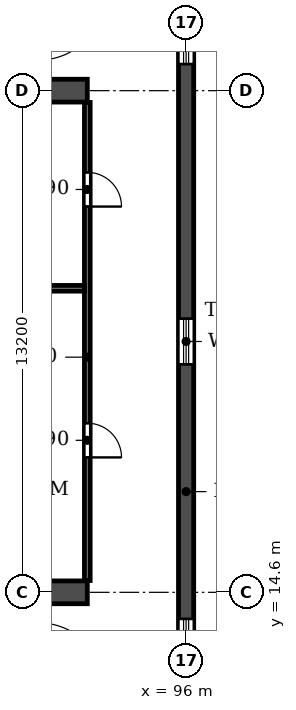
"""IFC4 building model, lengths in metres.
Left out: names, types, materials, properties, quantities, classifications, styles, units other than length and angle.
Written with IfcOpenShell. Run it as: python <this file> out.ifc"""

import sys

from ifc_helpers import new_model, si_unit, direction, frame, frame_2d, origin, place, context, subcontext, project, spatial, rectangle, extrude, element, fill, save


model = new_model("IFC4")
c1 = context("Model", 3, precision=1e-05, world=origin(), true_north=direction((0.0, 1.0)))
c2 = subcontext(c1, "Body", "Model", "MODEL_VIEW")
j1 = project(units=[si_unit("LENGTHUNIT", "METRE"), si_unit("PLANEANGLEUNIT", "RADIAN")], contexts=[c1])
p1 = place(None, origin())
s1 = spatial("IfcSite", under=j1, at=p1, CompositionType="ELEMENT")
p2 = place(p1, origin())
s2 = spatial("IfcBuilding", under=s1, at=p2, CompositionType="ELEMENT")
p3 = place(p2, frame((0.0, 0.0, 53.1)))
s3 = spatial("IfcBuildingStorey", under=s2, at=p3, CompositionType="ELEMENT", Elevation=53.1)
p4 = place(p3, frame((96.0, 4.683, 0.0), z_axis=(0.0, 0.0, 1.0), x_axis=(0.0, 1.0, 0.0)))
e1 = element("IfcWall", 1, at=p4, inside=s3, PredefinedType="SHEAR", context=c2, shape_type="SweptSolid", body=[
    extrude(rectangle(XDim=35.434, YDim=0.4, at=frame_2d((17.717, 0.0))), origin(), (0.0, 0.0, 1.0), 3.05),
])
p5 = place(p4, frame((15.917, 0.0, 0.9)))
e2 = element("IfcOpeningElement", 2, at=p5, cuts=e1, PredefinedType="OPENING", context=c2, shape_type="SweptSolid", body=[
    extrude(rectangle(XDim=1.2, YDim=1.5, at=frame_2d((0.6, 0.75))), frame((0.0, 0.21, 0.0), z_axis=(0.0, -1.0, 0.0), x_axis=(1.0, 0.0, 0.0)), (0.0, 0.0, 1.0), 0.42),
])
p6 = place(p4, frame((23.817, 0.0, 0.9)))
e3 = element("IfcOpeningElement", 3, at=p6, cuts=e1, PredefinedType="OPENING", context=c2, shape_type="SweptSolid", body=[
    extrude(rectangle(XDim=1.2, YDim=1.5, at=frame_2d((0.6, 0.75))), frame((0.0, 0.21, 0.0), z_axis=(0.0, -1.0, 0.0), x_axis=(1.0, 0.0, 0.0)), (0.0, 0.0, 1.0), 0.42),
])
p7 = place(p4, frame((8.017, 0.0, 0.9)))
e4 = element("IfcOpeningElement", 4, at=p7, cuts=e1, PredefinedType="OPENING", context=c2, shape_type="SweptSolid", body=[
    extrude(rectangle(XDim=1.2, YDim=1.5, at=frame_2d((0.6, 0.75))), frame((0.0, 0.21, 0.0), z_axis=(0.0, -1.0, 0.0), x_axis=(1.0, 0.0, 0.0)), (0.0, 0.0, 1.0), 0.42),
])
p8 = place(p4, frame((30.076, 0.0, 0.0)))
e5 = element("IfcOpeningElement", 5, at=p8, cuts=e1, PredefinedType="OPENING", context=c2, shape_type="SweptSolid", body=[
    extrude(rectangle(XDim=1.0, YDim=2.1, at=frame_2d((0.5, 1.05))), frame((0.0, 0.21, 0.0), z_axis=(0.0, -1.0, 0.0), x_axis=(1.0, 0.0, 0.0)), (0.0, 0.0, 1.0), 0.42),
])
p9 = place(p4, frame((3.159, 0.0, 0.0)))
e6 = element("IfcOpeningElement", 6, at=p9, cuts=e1, PredefinedType="OPENING", context=c2, shape_type="SweptSolid", body=[
    extrude(rectangle(XDim=1.0, YDim=2.1, at=frame_2d((0.5, 1.05))), frame((0.0, 0.21, 0.0), z_axis=(0.0, -1.0, 0.0), x_axis=(1.0, 0.0, 0.0)), (0.0, 0.0, 1.0), 0.42),
])
p10 = place(p3, frame((8.6, 14.6, 0.0), z_axis=(0.0, 0.0, 1.0), x_axis=(1.0, 0.0, 0.0)))
e7 = element("IfcWall", 7, at=p10, inside=s3, PredefinedType="SOLIDWALL", context=c2, shape_type="SweptSolid", body=[
    extrude(rectangle(XDim=84.8, YDim=0.6, at=frame_2d((42.4, 0.0))), origin(), (0.0, 0.0, 1.0), 3.05),
])
p11 = place(p10, frame((6.6, 0.0, 0.0)))
e8 = element("IfcOpeningElement", 8, at=p11, cuts=e7, PredefinedType="OPENING", context=c2, shape_type="SweptSolid", body=[
    extrude(rectangle(XDim=0.9, YDim=2.1, at=frame_2d((0.45, 1.05))), frame((0.0, 0.31, 0.0), z_axis=(0.0, -1.0, 0.0), x_axis=(1.0, 0.0, 0.0)), (0.0, 0.0, 1.0), 0.62),
])
p12 = place(p10, frame((10.3, 0.0, 0.0)))
e9 = element("IfcOpeningElement", 9, at=p12, cuts=e7, PredefinedType="OPENING", context=c2, shape_type="SweptSolid", body=[
    extrude(rectangle(XDim=1.0, YDim=2.1, at=frame_2d((0.5, 1.05))), frame((0.0, 0.31, 0.0), z_axis=(0.0, -1.0, 0.0), x_axis=(1.0, 0.0, 0.0)), (0.0, 0.0, 1.0), 0.62),
])
p13 = place(p10, frame((18.25, 0.0, 0.0)))
e10 = element("IfcOpeningElement", 10, at=p13, cuts=e7, PredefinedType="OPENING", context=c2, shape_type="SweptSolid", body=[
    extrude(rectangle(XDim=0.9, YDim=2.1, at=frame_2d((0.45, 1.05))), frame((0.0, 0.31, 0.0), z_axis=(0.0, -1.0, 0.0), x_axis=(1.0, 0.0, 0.0)), (0.0, 0.0, 1.0), 0.62),
])
p14 = place(p10, frame((22.8, 0.0, 0.0)))
e11 = element("IfcOpeningElement", 11, at=p14, cuts=e7, PredefinedType="OPENING", context=c2, shape_type="SweptSolid", body=[
    extrude(rectangle(XDim=1.0, YDim=2.1, at=frame_2d((0.5, 1.05))), frame((0.0, 0.31, 0.0), z_axis=(0.0, -1.0, 0.0), x_axis=(1.0, 0.0, 0.0)), (0.0, 0.0, 1.0), 0.62),
])
p15 = place(p10, frame((34.1, 0.0, 0.0)))
e12 = element("IfcOpeningElement", 12, at=p15, cuts=e7, PredefinedType="OPENING", context=c2, shape_type="SweptSolid", body=[
    extrude(rectangle(XDim=1.0, YDim=2.1, at=frame_2d((0.5, 1.05))), frame((0.0, 0.31, 0.0), z_axis=(0.0, -1.0, 0.0), x_axis=(1.0, 0.0, 0.0)), (0.0, 0.0, 1.0), 0.62),
])
p16 = place(p10, frame((38.0, 0.0, 0.0)))
e13 = element("IfcOpeningElement", 13, at=p16, cuts=e7, PredefinedType="OPENING", context=c2, shape_type="SweptSolid", body=[
    extrude(rectangle(XDim=1.0, YDim=2.1, at=frame_2d((0.5, 1.05))), frame((0.0, 0.31, 0.0), z_axis=(0.0, -1.0, 0.0), x_axis=(1.0, 0.0, 0.0)), (0.0, 0.0, 1.0), 0.62),
])
p17 = place(p10, frame((41.9, 0.0, 0.0)))
e14 = element("IfcOpeningElement", 14, at=p17, cuts=e7, PredefinedType="OPENING", context=c2, shape_type="SweptSolid", body=[
    extrude(rectangle(XDim=1.0, YDim=2.1, at=frame_2d((0.5, 1.05))), frame((0.0, 0.31, 0.0), z_axis=(0.0, -1.0, 0.0), x_axis=(1.0, 0.0, 0.0)), (0.0, 0.0, 1.0), 0.62),
])
p18 = place(p10, frame((45.8, 0.0, 0.0)))
e15 = element("IfcOpeningElement", 15, at=p18, cuts=e7, PredefinedType="OPENING", context=c2, shape_type="SweptSolid", body=[
    extrude(rectangle(XDim=1.0, YDim=2.1, at=frame_2d((0.5, 1.05))), frame((0.0, 0.31, 0.0), z_axis=(0.0, -1.0, 0.0), x_axis=(1.0, 0.0, 0.0)), (0.0, 0.0, 1.0), 0.62),
])
p19 = place(p10, frame((49.7, 0.0, 0.0)))
e16 = element("IfcOpeningElement", 16, at=p19, cuts=e7, PredefinedType="OPENING", context=c2, shape_type="SweptSolid", body=[
    extrude(rectangle(XDim=1.0, YDim=2.1, at=frame_2d((0.5, 1.05))), frame((0.0, 0.31, 0.0), z_axis=(0.0, -1.0, 0.0), x_axis=(1.0, 0.0, 0.0)), (0.0, 0.0, 1.0), 0.62),
])
p20 = place(p10, frame((61.0, 0.0, 0.0)))
e17 = element("IfcOpeningElement", 17, at=p20, cuts=e7, PredefinedType="OPENING", context=c2, shape_type="SweptSolid", body=[
    extrude(rectangle(XDim=1.0, YDim=2.1, at=frame_2d((0.5, 1.05))), frame((0.0, 0.31, 0.0), z_axis=(0.0, -1.0, 0.0), x_axis=(1.0, 0.0, 0.0)), (0.0, 0.0, 1.0), 0.62),
])
p21 = place(p10, frame((65.65, 0.0, 0.0)))
e18 = element("IfcOpeningElement", 18, at=p21, cuts=e7, PredefinedType="OPENING", context=c2, shape_type="SweptSolid", body=[
    extrude(rectangle(XDim=0.9, YDim=2.1, at=frame_2d((0.45, 1.05))), frame((0.0, 0.31, 0.0), z_axis=(0.0, -1.0, 0.0), x_axis=(1.0, 0.0, 0.0)), (0.0, 0.0, 1.0), 0.62),
])
p22 = place(p10, frame((73.5, 0.0, 0.0)))
e19 = element("IfcOpeningElement", 19, at=p22, cuts=e7, PredefinedType="OPENING", context=c2, shape_type="SweptSolid", body=[
    extrude(rectangle(XDim=1.0, YDim=2.1, at=frame_2d((0.5, 1.05))), frame((0.0, 0.31, 0.0), z_axis=(0.0, -1.0, 0.0), x_axis=(1.0, 0.0, 0.0)), (0.0, 0.0, 1.0), 0.62),
])
p23 = place(p10, frame((77.3, 0.0, 0.0)))
e20 = element("IfcOpeningElement", 20, at=p23, cuts=e7, PredefinedType="OPENING", context=c2, shape_type="SweptSolid", body=[
    extrude(rectangle(XDim=0.9, YDim=2.1, at=frame_2d((0.45, 1.05))), frame((0.0, 0.31, 0.0), z_axis=(0.0, -1.0, 0.0), x_axis=(1.0, 0.0, 0.0)), (0.0, 0.0, 1.0), 0.62),
])
p24 = place(p3, frame((8.6, 27.8, 0.0), z_axis=(0.0, 0.0, 1.0), x_axis=(1.0, 0.0, 0.0)))
e21 = element("IfcWall", 21, at=p24, inside=s3, PredefinedType="SOLIDWALL", context=c2, shape_type="SweptSolid", body=[
    extrude(rectangle(XDim=84.8, YDim=0.6, at=frame_2d((42.4, 0.0))), origin(), (0.0, 0.0, 1.0), 3.05),
])
p25 = place(p24, frame((6.6, 0.0, 0.0)))
e22 = element("IfcOpeningElement", 22, at=p25, cuts=e21, PredefinedType="OPENING", context=c2, shape_type="SweptSolid", body=[
    extrude(rectangle(XDim=0.9, YDim=2.1, at=frame_2d((0.45, 1.05))), frame((0.0, 0.31, 0.0), z_axis=(0.0, -1.0, 0.0), x_axis=(1.0, 0.0, 0.0)), (0.0, 0.0, 1.0), 0.62),
])
p26 = place(p24, frame((10.3, 0.0, 0.0)))
e23 = element("IfcOpeningElement", 23, at=p26, cuts=e21, PredefinedType="OPENING", context=c2, shape_type="SweptSolid", body=[
    extrude(rectangle(XDim=1.0, YDim=2.1, at=frame_2d((0.5, 1.05))), frame((0.0, 0.31, 0.0), z_axis=(0.0, -1.0, 0.0), x_axis=(1.0, 0.0, 0.0)), (0.0, 0.0, 1.0), 0.62),
])
p27 = place(p24, frame((13.65, 0.0, 0.0)))
e24 = element("IfcOpeningElement", 24, at=p27, cuts=e21, PredefinedType="OPENING", context=c2, shape_type="SweptSolid", body=[
    extrude(rectangle(XDim=0.9, YDim=2.1, at=frame_2d((0.45, 1.05))), frame((0.0, 0.31, 0.0), z_axis=(0.0, -1.0, 0.0), x_axis=(1.0, 0.0, 0.0)), (0.0, 0.0, 1.0), 0.62),
])
p28 = place(p24, frame((18.25, 0.0, 0.0)))
e25 = element("IfcOpeningElement", 25, at=p28, cuts=e21, PredefinedType="OPENING", context=c2, shape_type="SweptSolid", body=[
    extrude(rectangle(XDim=0.9, YDim=2.1, at=frame_2d((0.45, 1.05))), frame((0.0, 0.31, 0.0), z_axis=(0.0, -1.0, 0.0), x_axis=(1.0, 0.0, 0.0)), (0.0, 0.0, 1.0), 0.62),
])
p29 = place(p24, frame((22.85, 0.0, 0.0)))
e26 = element("IfcOpeningElement", 26, at=p29, cuts=e21, PredefinedType="OPENING", context=c2, shape_type="SweptSolid", body=[
    extrude(rectangle(XDim=0.9, YDim=2.1, at=frame_2d((0.45, 1.05))), frame((0.0, 0.31, 0.0), z_axis=(0.0, -1.0, 0.0), x_axis=(1.0, 0.0, 0.0)), (0.0, 0.0, 1.0), 0.62),
])
p30 = place(p24, frame((26.0, 0.0, 0.0)))
e27 = element("IfcOpeningElement", 27, at=p30, cuts=e21, PredefinedType="OPENING", context=c2, shape_type="SweptSolid", body=[
    extrude(rectangle(XDim=1.0, YDim=2.1, at=frame_2d((0.5, 1.05))), frame((0.0, 0.31, 0.0), z_axis=(0.0, -1.0, 0.0), x_axis=(1.0, 0.0, 0.0)), (0.0, 0.0, 1.0), 0.62),
])
p31 = place(p24, frame((31.2, 0.0, 0.0)))
e28 = element("IfcOpeningElement", 28, at=p31, cuts=e21, PredefinedType="OPENING", context=c2, shape_type="SweptSolid", body=[
    extrude(rectangle(XDim=1.0, YDim=2.1, at=frame_2d((0.5, 1.05))), frame((0.0, 0.31, 0.0), z_axis=(0.0, -1.0, 0.0), x_axis=(1.0, 0.0, 0.0)), (0.0, 0.0, 1.0), 0.62),
])
p32 = place(p24, frame((39.0, 0.0, 0.0)))
e29 = element("IfcOpeningElement", 29, at=p32, cuts=e21, PredefinedType="OPENING", context=c2, shape_type="SweptSolid", body=[
    extrude(rectangle(XDim=1.0, YDim=2.1, at=frame_2d((0.5, 1.05))), frame((0.0, 0.31, 0.0), z_axis=(0.0, -1.0, 0.0), x_axis=(1.0, 0.0, 0.0)), (0.0, 0.0, 1.0), 0.62),
])
p33 = place(p24, frame((41.9, 0.0, 0.0)))
e30 = element("IfcOpeningElement", 30, at=p33, cuts=e21, PredefinedType="OPENING", context=c2, shape_type="SweptSolid", body=[
    extrude(rectangle(XDim=1.0, YDim=2.1, at=frame_2d((0.5, 1.05))), frame((0.0, 0.31, 0.0), z_axis=(0.0, -1.0, 0.0), x_axis=(1.0, 0.0, 0.0)), (0.0, 0.0, 1.0), 0.62),
])
p34 = place(p24, frame((44.8, 0.0, 0.0)))
e31 = element("IfcOpeningElement", 31, at=p34, cuts=e21, PredefinedType="OPENING", context=c2, shape_type="SweptSolid", body=[
    extrude(rectangle(XDim=1.0, YDim=2.1, at=frame_2d((0.5, 1.05))), frame((0.0, 0.31, 0.0), z_axis=(0.0, -1.0, 0.0), x_axis=(1.0, 0.0, 0.0)), (0.0, 0.0, 1.0), 0.62),
])
p35 = place(p24, frame((48.7, 0.0, 0.0)))
e32 = element("IfcOpeningElement", 32, at=p35, cuts=e21, PredefinedType="OPENING", context=c2, shape_type="SweptSolid", body=[
    extrude(rectangle(XDim=1.0, YDim=2.1, at=frame_2d((0.5, 1.05))), frame((0.0, 0.31, 0.0), z_axis=(0.0, -1.0, 0.0), x_axis=(1.0, 0.0, 0.0)), (0.0, 0.0, 1.0), 0.62),
])
p36 = place(p24, frame((53.65, 0.0, 0.0)))
e33 = element("IfcOpeningElement", 33, at=p36, cuts=e21, PredefinedType="OPENING", context=c2, shape_type="SweptSolid", body=[
    extrude(rectangle(XDim=1.5, YDim=2.1, at=frame_2d((0.75, 1.05))), frame((0.0, 0.31, 0.0), z_axis=(0.0, -1.0, 0.0), x_axis=(1.0, 0.0, 0.0)), (0.0, 0.0, 1.0), 0.62),
])
p37 = place(p24, frame((57.8, 0.0, 0.0)))
e34 = element("IfcOpeningElement", 34, at=p37, cuts=e21, PredefinedType="OPENING", context=c2, shape_type="SweptSolid", body=[
    extrude(rectangle(XDim=1.0, YDim=2.1, at=frame_2d((0.5, 1.05))), frame((0.0, 0.31, 0.0), z_axis=(0.0, -1.0, 0.0), x_axis=(1.0, 0.0, 0.0)), (0.0, 0.0, 1.0), 0.62),
])
p38 = place(p24, frame((61.05, 0.0, 0.0)))
e35 = element("IfcOpeningElement", 35, at=p38, cuts=e21, PredefinedType="OPENING", context=c2, shape_type="SweptSolid", body=[
    extrude(rectangle(XDim=0.9, YDim=2.1, at=frame_2d((0.45, 1.05))), frame((0.0, 0.31, 0.0), z_axis=(0.0, -1.0, 0.0), x_axis=(1.0, 0.0, 0.0)), (0.0, 0.0, 1.0), 0.62),
])
p39 = place(p24, frame((65.65, 0.0, 0.0)))
e36 = element("IfcOpeningElement", 36, at=p39, cuts=e21, PredefinedType="OPENING", context=c2, shape_type="SweptSolid", body=[
    extrude(rectangle(XDim=0.9, YDim=2.1, at=frame_2d((0.45, 1.05))), frame((0.0, 0.31, 0.0), z_axis=(0.0, -1.0, 0.0), x_axis=(1.0, 0.0, 0.0)), (0.0, 0.0, 1.0), 0.62),
])
p40 = place(p24, frame((70.25, 0.0, 0.0)))
e37 = element("IfcOpeningElement", 37, at=p40, cuts=e21, PredefinedType="OPENING", context=c2, shape_type="SweptSolid", body=[
    extrude(rectangle(XDim=0.9, YDim=2.1, at=frame_2d((0.45, 1.05))), frame((0.0, 0.31, 0.0), z_axis=(0.0, -1.0, 0.0), x_axis=(1.0, 0.0, 0.0)), (0.0, 0.0, 1.0), 0.62),
])
p41 = place(p24, frame((73.5, 0.0, 0.0)))
e38 = element("IfcOpeningElement", 38, at=p41, cuts=e21, PredefinedType="OPENING", context=c2, shape_type="SweptSolid", body=[
    extrude(rectangle(XDim=1.0, YDim=2.1, at=frame_2d((0.5, 1.05))), frame((0.0, 0.31, 0.0), z_axis=(0.0, -1.0, 0.0), x_axis=(1.0, 0.0, 0.0)), (0.0, 0.0, 1.0), 0.62),
])
p42 = place(p24, frame((77.3, 0.0, 0.0)))
e39 = element("IfcOpeningElement", 39, at=p42, cuts=e21, PredefinedType="OPENING", context=c2, shape_type="SweptSolid", body=[
    extrude(rectangle(XDim=0.9, YDim=2.1, at=frame_2d((0.45, 1.05))), frame((0.0, 0.31, 0.0), z_axis=(0.0, -1.0, 0.0), x_axis=(1.0, 0.0, 0.0)), (0.0, 0.0, 1.0), 0.62),
])
p43 = place(p3, frame((93.4, 14.91, 0.0), z_axis=(0.0, 0.0, 1.0), x_axis=(0.0, 1.0, 0.0)))
e40 = element("IfcWall", 40, at=p43, inside=s3, PredefinedType="PARTITIONING", context=c2, shape_type="SweptSolid", body=[
    extrude(rectangle(XDim=12.58, YDim=0.15, at=frame_2d((6.29, 0.0))), origin(), (0.0, 0.0, 1.0), 3.05),
])
p44 = place(p43, frame((3.24, 0.0, 0.0)))
e41 = element("IfcOpeningElement", 41, at=p44, cuts=e40, PredefinedType="OPENING", context=c2, shape_type="SweptSolid", body=[
    extrude(rectangle(XDim=0.9, YDim=2.1, at=frame_2d((0.45, 1.05))), frame((0.0, 0.085, 0.0), z_axis=(0.0, -1.0, 0.0), x_axis=(1.0, 0.0, 0.0)), (0.0, 0.0, 1.0), 0.17),
])
p45 = place(p43, frame((9.84, 0.0, 0.0)))
e42 = element("IfcOpeningElement", 42, at=p45, cuts=e40, PredefinedType="OPENING", context=c2, shape_type="SweptSolid", body=[
    extrude(rectangle(XDim=0.9, YDim=2.1, at=frame_2d((0.45, 1.05))), frame((0.0, 0.085, 0.0), z_axis=(0.0, -1.0, 0.0), x_axis=(1.0, 0.0, 0.0)), (0.0, 0.0, 1.0), 0.17),
])
p46 = place(p3, frame((84.075, 22.6, 0.0), z_axis=(0.0, 0.0, 1.0), x_axis=(1.0, 0.0, 0.0)))
e43 = element("IfcWall", 43, at=p46, inside=s3, PredefinedType="PARTITIONING", context=c2, shape_type="SweptSolid", body=[
    extrude(rectangle(XDim=9.25, YDim=0.15, at=frame_2d((4.625, 0.0))), origin(), (0.0, 0.0, 1.0), 3.05),
])
p47 = place(p5, origin())
e44 = element("IfcWindow", 44, at=p47, inside=s3, PartitioningType="SINGLE_PANEL", PredefinedType="WINDOW", context=c2, shape_type="SweptSolid", body=[
    extrude(rectangle(XDim=1.2, YDim=1.5, at=frame_2d((0.6, 0.75))), frame((0.0, 0.03, 0.0), z_axis=(0.0, -1.0, 0.0), x_axis=(1.0, 0.0, 0.0)), (0.0, 0.0, 1.0), 0.06),
])
fill(e2, e44)
p48 = place(p6, origin())
e45 = element("IfcWindow", 45, at=p48, inside=s3, PartitioningType="SINGLE_PANEL", PredefinedType="WINDOW", context=c2, shape_type="SweptSolid", body=[
    extrude(rectangle(XDim=1.2, YDim=1.5, at=frame_2d((0.6, 0.75))), frame((0.0, 0.03, 0.0), z_axis=(0.0, -1.0, 0.0), x_axis=(1.0, 0.0, 0.0)), (0.0, 0.0, 1.0), 0.06),
])
fill(e3, e45)
p49 = place(p7, origin())
e46 = element("IfcWindow", 46, at=p49, inside=s3, PartitioningType="SINGLE_PANEL", PredefinedType="WINDOW", context=c2, shape_type="SweptSolid", body=[
    extrude(rectangle(XDim=1.2, YDim=1.5, at=frame_2d((0.6, 0.75))), frame((0.0, 0.03, 0.0), z_axis=(0.0, -1.0, 0.0), x_axis=(1.0, 0.0, 0.0)), (0.0, 0.0, 1.0), 0.06),
])
fill(e4, e46)
p50 = place(p44, frame((0.9, 0.0, 0.0), z_axis=(0.0, 0.0, 1.0), x_axis=(-1.0, 0.0, 0.0)))
e47 = element("IfcDoor", 47, at=p50, inside=s3, OperationType="SINGLE_SWING_RIGHT", PredefinedType="DOOR", context=c2, shape_type="SweptSolid", body=[
    extrude(rectangle(XDim=0.9, YDim=2.1, at=frame_2d((0.45, 1.05))), frame((0.0, 0.025, 0.0), z_axis=(0.0, -1.0, 0.0), x_axis=(1.0, 0.0, 0.0)), (0.0, 0.0, 1.0), 0.05),
])
fill(e41, e47)
p51 = place(p45, frame((0.9, 0.0, 0.0), z_axis=(0.0, 0.0, 1.0), x_axis=(-1.0, 0.0, 0.0)))
e48 = element("IfcDoor", 48, at=p51, inside=s3, OperationType="SINGLE_SWING_RIGHT", PredefinedType="DOOR", context=c2, shape_type="SweptSolid", body=[
    extrude(rectangle(XDim=0.9, YDim=2.1, at=frame_2d((0.45, 1.05))), frame((0.0, 0.025, 0.0), z_axis=(0.0, -1.0, 0.0), x_axis=(1.0, 0.0, 0.0)), (0.0, 0.0, 1.0), 0.05),
])
fill(e42, e48)
save(model, sys.argv[1])
